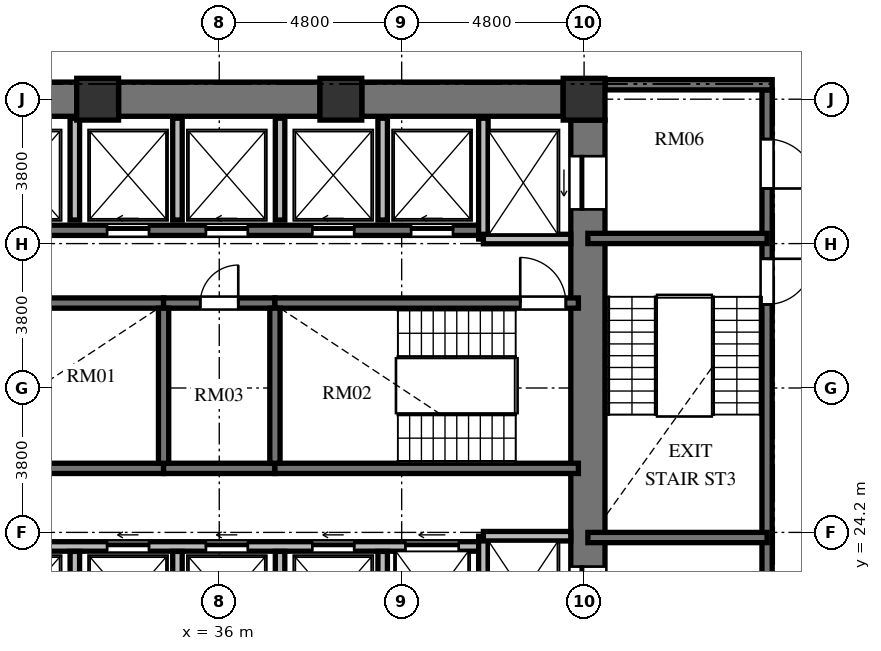
"""IFC4 building model, lengths in metres.
Left out: names, types, materials, properties, quantities, classifications, styles, units other than length and angle.
Written with IfcOpenShell. Run it as: python <this file> out.ifc"""

import sys

from ifc_helpers import new_model, si_unit, direction, frame, frame_2d, origin, origin_2d, place, context, subcontext, project, spatial, rectangle, extrude, element, fill, save


model = new_model("IFC4")
c1 = context("Model", 3, precision=1e-05, world=origin(), true_north=direction((0.0, 1.0)))
c2 = subcontext(c1, "Body", "Model", "MODEL_VIEW")
j1 = project(units=[si_unit("LENGTHUNIT", "METRE"), si_unit("PLANEANGLEUNIT", "RADIAN")], contexts=[c1])
p1 = place(None, origin())
s1 = spatial("IfcSite", under=j1, at=p1, CompositionType="ELEMENT")
p2 = place(p1, origin())
s2 = spatial("IfcBuilding", under=s1, at=p2, CompositionType="ELEMENT")
p3 = place(p2, frame((0.0, 0.0, 72.624)))
s3 = spatial("IfcBuildingStorey", under=s2, at=p3, CompositionType="ELEMENT", Elevation=72.624)
for number, where, z_axis, x_axis in (
    (1, (45.6, 35.6, 0.0), (0.0, 0.0, 1.0), (1.0, 0.0, 0.0)),
    (2, (39.2, 35.6, 0.0), (0.0, 0.0, 1.0), (1.0, 0.0, 0.0)),
    (3, (32.8, 35.6, 0.0), (0.0, 0.0, 1.0), (1.0, 0.0, 0.0)),
):
    element("IfcColumn", number, at=place(p3, frame(where, z_axis=z_axis, x_axis=x_axis)), inside=s3, PredefinedType="COLUMN", context=c2, shape_type="SweptSolid", body=[
        extrude(rectangle(XDim=1.1, YDim=1.1, at=origin_2d()), origin(), (0.0, 0.0, 1.0), 3.648),
    ])
p4 = place(p3, frame((45.7, 20.95, 0.0), z_axis=(0.0, 0.0, 1.0), x_axis=(0.0, 1.0, 0.0)))
e4 = element("IfcWall", 4, at=p4, inside=s3, PredefinedType="SHEAR", context=c2, shape_type="SweptSolid", body=[
    extrude(rectangle(XDim=14.1, YDim=0.9, at=frame_2d((7.05, 0.0))), origin(), (0.0, 0.0, 1.0), 3.648),
])
p5 = place(p4, frame((11.75, 0.0, 0.0)))
e5 = element("IfcOpeningElement", 5, at=p5, cuts=e4, PredefinedType="OPENING", context=c2, shape_type="SweptSolid", body=[
    extrude(rectangle(XDim=1.4, YDim=2.3, at=frame_2d((0.7, 1.15))), frame((0.0, 0.46, 0.0), z_axis=(0.0, -1.0, 0.0), x_axis=(1.0, 0.0, 0.0)), (0.0, 0.0, 1.0), 0.92),
])
p6 = place(p4, frame((0.95, 0.0, 0.0)))
e6 = element("IfcOpeningElement", 6, at=p6, cuts=e4, PredefinedType="OPENING", context=c2, shape_type="SweptSolid", body=[
    extrude(rectangle(XDim=1.4, YDim=2.3, at=frame_2d((0.7, 1.15))), frame((0.0, 0.46, 0.0), z_axis=(0.0, -1.0, 0.0), x_axis=(1.0, 0.0, 0.0)), (0.0, 0.0, 1.0), 0.92),
])
p7 = place(p3, frame((26.95, 35.6, 0.0), z_axis=(0.0, 0.0, 1.0), x_axis=(1.0, 0.0, 0.0)))
e7 = element("IfcWall", 7, at=p7, inside=s3, PredefinedType="SHEAR", context=c2, shape_type="SweptSolid", body=[
    extrude(rectangle(XDim=5.3, YDim=0.9, at=frame_2d((2.65, 0.0))), origin(), (0.0, 0.0, 1.0), 3.648),
])
p8 = place(p3, frame((33.35, 35.6, 0.0), z_axis=(0.0, 0.0, 1.0), x_axis=(1.0, 0.0, 0.0)))
e8 = element("IfcWall", 8, at=p8, inside=s3, PredefinedType="SHEAR", context=c2, shape_type="SweptSolid", body=[
    extrude(rectangle(XDim=5.3, YDim=0.9, at=frame_2d((2.65, 0.0))), origin(), (0.0, 0.0, 1.0), 3.648),
])
p9 = place(p3, frame((39.75, 35.6, 0.0), z_axis=(0.0, 0.0, 1.0), x_axis=(1.0, 0.0, 0.0)))
e9 = element("IfcWall", 9, at=p9, inside=s3, PredefinedType="SHEAR", context=c2, shape_type="SweptSolid", body=[
    extrude(rectangle(XDim=5.3, YDim=0.9, at=frame_2d((2.65, 0.0))), origin(), (0.0, 0.0, 1.0), 3.648),
])
p10 = place(p3, frame((26.55, 30.235, 0.0), z_axis=(0.0, 0.0, 1.0), x_axis=(1.0, 0.0, 0.0)))
e10 = element("IfcWall", 10, at=p10, inside=s3, PredefinedType="SHEAR", context=c2, shape_type="SweptSolid", body=[
    extrude(rectangle(XDim=7.985, YDim=0.27, at=frame_2d((3.992, 0.0))), origin(), (0.0, 0.0, 1.0), 3.648),
])
p11 = place(p3, frame((34.535, 30.235, 0.0), z_axis=(0.0, 0.0, 1.0), x_axis=(1.0, 0.0, 0.0)))
e11 = element("IfcWall", 11, at=p11, inside=s3, PredefinedType="SHEAR", context=c2, shape_type="SweptSolid", body=[
    extrude(rectangle(XDim=2.93, YDim=0.27, at=frame_2d((1.465, 0.0))), origin(), (0.0, 0.0, 1.0), 3.648),
])
p12 = place(p11, frame((0.965, 0.0, 0.0)))
e12 = element("IfcOpeningElement", 12, at=p12, cuts=e11, PredefinedType="OPENING", context=c2, shape_type="SweptSolid", body=[
    extrude(rectangle(XDim=1.0, YDim=2.1, at=frame_2d((0.5, 1.05))), frame((0.0, 0.145, 0.0), z_axis=(0.0, -1.0, 0.0), x_axis=(1.0, 0.0, 0.0)), (0.0, 0.0, 1.0), 0.29),
])
p13 = place(p3, frame((37.465, 30.235, 0.0), z_axis=(0.0, 0.0, 1.0), x_axis=(1.0, 0.0, 0.0)))
e13 = element("IfcWall", 13, at=p13, inside=s3, PredefinedType="SHEAR", context=c2, shape_type="SweptSolid", body=[
    extrude(rectangle(XDim=7.985, YDim=0.27, at=frame_2d((3.992, 0.0))), origin(), (0.0, 0.0, 1.0), 3.648),
])
p14 = place(p13, frame((6.455, 0.0, 0.0)))
e14 = element("IfcOpeningElement", 14, at=p14, cuts=e13, PredefinedType="OPENING", context=c2, shape_type="SweptSolid", body=[
    extrude(rectangle(XDim=1.2, YDim=2.15, at=frame_2d((0.6, 1.075))), frame((0.0, 0.145, 0.0), z_axis=(0.0, -1.0, 0.0), x_axis=(1.0, 0.0, 0.0)), (0.0, 0.0, 1.0), 0.29),
])
p15 = place(p3, frame((26.55, 25.885, 0.0), z_axis=(0.0, 0.0, 1.0), x_axis=(1.0, 0.0, 0.0)))
e15 = element("IfcWall", 15, at=p15, inside=s3, PredefinedType="SHEAR", context=c2, shape_type="SweptSolid", body=[
    extrude(rectangle(XDim=7.985, YDim=0.27, at=frame_2d((3.992, 0.0))), origin(), (0.0, 0.0, 1.0), 3.648),
])
p16 = place(p3, frame((34.535, 25.885, 0.0), z_axis=(0.0, 0.0, 1.0), x_axis=(1.0, 0.0, 0.0)))
e16 = element("IfcWall", 16, at=p16, inside=s3, PredefinedType="SHEAR", context=c2, shape_type="SweptSolid", body=[
    extrude(rectangle(XDim=2.93, YDim=0.27, at=frame_2d((1.465, 0.0))), origin(), (0.0, 0.0, 1.0), 3.648),
])
p17 = place(p3, frame((37.465, 25.885, 0.0), z_axis=(0.0, 0.0, 1.0), x_axis=(1.0, 0.0, 0.0)))
e17 = element("IfcWall", 17, at=p17, inside=s3, PredefinedType="SHEAR", context=c2, shape_type="SweptSolid", body=[
    extrude(rectangle(XDim=7.985, YDim=0.27, at=frame_2d((3.992, 0.0))), origin(), (0.0, 0.0, 1.0), 3.648),
])
for number, where, z_axis, x_axis in (
    (18, (34.535, 26.02, 0.0), (0.0, 0.0, 1.0), (0.0, 1.0, 0.0)),
    (19, (37.465, 26.02, 0.0), (0.0, 0.0, 1.0), (0.0, 1.0, 0.0)),
):
    element("IfcWall", number, at=place(p3, frame(where, z_axis=z_axis, x_axis=x_axis)), inside=s3, PredefinedType="SHEAR", context=c2, shape_type="SweptSolid", body=[
        extrude(rectangle(XDim=4.08, YDim=0.27, at=frame_2d((2.04, 0.0))), origin(), (0.0, 0.0, 1.0), 3.648),
    ])
p18 = place(p3, frame((26.55, 32.15, 0.0), z_axis=(0.0, 0.0, 1.0), x_axis=(1.0, 0.0, 0.0)))
e20 = element("IfcWall", 20, at=p18, inside=s3, PredefinedType="SHEAR", context=c2, shape_type="SweptSolid", body=[
    extrude(rectangle(XDim=16.4, YDim=0.27, at=frame_2d((8.2, 0.0))), origin(), (0.0, 0.0, 1.0), 3.648),
])
p19 = place(p18, frame((1.1, 0.0, 0.0)))
e21 = element("IfcOpeningElement", 21, at=p19, cuts=e20, PredefinedType="OPENING", context=c2, shape_type="SweptSolid", body=[
    extrude(rectangle(XDim=1.1, YDim=2.2, at=frame_2d((0.55, 1.1))), frame((0.0, 0.145, 0.0), z_axis=(0.0, -1.0, 0.0), x_axis=(1.0, 0.0, 0.0)), (0.0, 0.0, 1.0), 0.29),
])
p20 = place(p18, frame((3.7, 0.0, 0.0)))
e22 = element("IfcOpeningElement", 22, at=p20, cuts=e20, PredefinedType="OPENING", context=c2, shape_type="SweptSolid", body=[
    extrude(rectangle(XDim=1.1, YDim=2.2, at=frame_2d((0.55, 1.1))), frame((0.0, 0.145, 0.0), z_axis=(0.0, -1.0, 0.0), x_axis=(1.0, 0.0, 0.0)), (0.0, 0.0, 1.0), 0.29),
])
p21 = place(p18, frame((6.5, 0.0, 0.0)))
e23 = element("IfcOpeningElement", 23, at=p21, cuts=e20, PredefinedType="OPENING", context=c2, shape_type="SweptSolid", body=[
    extrude(rectangle(XDim=1.1, YDim=2.2, at=frame_2d((0.55, 1.1))), frame((0.0, 0.145, 0.0), z_axis=(0.0, -1.0, 0.0), x_axis=(1.0, 0.0, 0.0)), (0.0, 0.0, 1.0), 0.29),
])
p22 = place(p18, frame((9.1, 0.0, 0.0)))
e24 = element("IfcOpeningElement", 24, at=p22, cuts=e20, PredefinedType="OPENING", context=c2, shape_type="SweptSolid", body=[
    extrude(rectangle(XDim=1.1, YDim=2.2, at=frame_2d((0.55, 1.1))), frame((0.0, 0.145, 0.0), z_axis=(0.0, -1.0, 0.0), x_axis=(1.0, 0.0, 0.0)), (0.0, 0.0, 1.0), 0.29),
])
p23 = place(p18, frame((11.9, 0.0, 0.0)))
e25 = element("IfcOpeningElement", 25, at=p23, cuts=e20, PredefinedType="OPENING", context=c2, shape_type="SweptSolid", body=[
    extrude(rectangle(XDim=1.1, YDim=2.2, at=frame_2d((0.55, 1.1))), frame((0.0, 0.145, 0.0), z_axis=(0.0, -1.0, 0.0), x_axis=(1.0, 0.0, 0.0)), (0.0, 0.0, 1.0), 0.29),
])
p24 = place(p18, frame((14.5, 0.0, 0.0)))
e26 = element("IfcOpeningElement", 26, at=p24, cuts=e20, PredefinedType="OPENING", context=c2, shape_type="SweptSolid", body=[
    extrude(rectangle(XDim=1.1, YDim=2.2, at=frame_2d((0.55, 1.1))), frame((0.0, 0.145, 0.0), z_axis=(0.0, -1.0, 0.0), x_axis=(1.0, 0.0, 0.0)), (0.0, 0.0, 1.0), 0.29),
])
p25 = place(p3, frame((26.75, 23.83, 0.0), z_axis=(0.0, 0.0, 1.0), x_axis=(1.0, 0.0, 0.0)))
e27 = element("IfcWall", 27, at=p25, inside=s3, PredefinedType="SOLIDWALL", context=c2, shape_type="SweptSolid", body=[
    extrude(rectangle(XDim=16.2, YDim=0.25, at=frame_2d((8.1, 0.0))), origin(), (0.0, 0.0, 1.0), 3.198),
])
p26 = place(p25, frame((0.9, 0.0, 0.0)))
e28 = element("IfcOpeningElement", 28, at=p26, cuts=e27, PredefinedType="OPENING", context=c2, shape_type="SweptSolid", body=[
    extrude(rectangle(XDim=1.1, YDim=2.2, at=frame_2d((0.55, 1.1))), frame((0.0, 0.135, 0.0), z_axis=(0.0, -1.0, 0.0), x_axis=(1.0, 0.0, 0.0)), (0.0, 0.0, 1.0), 0.27),
])
p27 = place(p25, frame((3.5, 0.0, 0.0)))
e29 = element("IfcOpeningElement", 29, at=p27, cuts=e27, PredefinedType="OPENING", context=c2, shape_type="SweptSolid", body=[
    extrude(rectangle(XDim=1.1, YDim=2.2, at=frame_2d((0.55, 1.1))), frame((0.0, 0.135, 0.0), z_axis=(0.0, -1.0, 0.0), x_axis=(1.0, 0.0, 0.0)), (0.0, 0.0, 1.0), 0.27),
])
p28 = place(p25, frame((6.3, 0.0, 0.0)))
e30 = element("IfcOpeningElement", 30, at=p28, cuts=e27, PredefinedType="OPENING", context=c2, shape_type="SweptSolid", body=[
    extrude(rectangle(XDim=1.1, YDim=2.2, at=frame_2d((0.55, 1.1))), frame((0.0, 0.135, 0.0), z_axis=(0.0, -1.0, 0.0), x_axis=(1.0, 0.0, 0.0)), (0.0, 0.0, 1.0), 0.27),
])
p29 = place(p25, frame((8.9, 0.0, 0.0)))
e31 = element("IfcOpeningElement", 31, at=p29, cuts=e27, PredefinedType="OPENING", context=c2, shape_type="SweptSolid", body=[
    extrude(rectangle(XDim=1.1, YDim=2.2, at=frame_2d((0.55, 1.1))), frame((0.0, 0.135, 0.0), z_axis=(0.0, -1.0, 0.0), x_axis=(1.0, 0.0, 0.0)), (0.0, 0.0, 1.0), 0.27),
])
p30 = place(p25, frame((11.7, 0.0, 0.0)))
e32 = element("IfcOpeningElement", 32, at=p30, cuts=e27, PredefinedType="OPENING", context=c2, shape_type="SweptSolid", body=[
    extrude(rectangle(XDim=1.1, YDim=2.2, at=frame_2d((0.55, 1.1))), frame((0.0, 0.135, 0.0), z_axis=(0.0, -1.0, 0.0), x_axis=(1.0, 0.0, 0.0)), (0.0, 0.0, 1.0), 0.27),
])
p31 = place(p25, frame((14.15, 0.0, 0.0)))
e33 = element("IfcOpeningElement", 33, at=p31, cuts=e27, PredefinedType="OPENING", context=c2, shape_type="SweptSolid", body=[
    extrude(rectangle(XDim=1.4, YDim=2.3, at=frame_2d((0.7, 1.15))), frame((0.0, 0.135, 0.0), z_axis=(0.0, -1.0, 0.0), x_axis=(1.0, 0.0, 0.0)), (0.0, 0.0, 1.0), 0.27),
])
p32 = place(p3, frame((42.95, 31.92, 0.0), z_axis=(0.0, 0.0, 1.0), x_axis=(0.0, 1.0, 0.0)))
e34 = element("IfcWall", 34, at=p32, inside=s3, PredefinedType="SOLIDWALL", context=c2, shape_type="SweptSolid", body=[
    extrude(rectangle(XDim=3.18, YDim=0.25, at=frame_2d((1.59, 0.0))), origin(), (0.0, 0.0, 1.0), 3.198),
])
p33 = place(p3, frame((42.95, 31.92, 0.0), z_axis=(0.0, 0.0, 1.0), x_axis=(1.0, 0.0, 0.0)))
e35 = element("IfcWall", 35, at=p33, inside=s3, PredefinedType="SOLIDWALL", context=c2, shape_type="SweptSolid", body=[
    extrude(rectangle(XDim=2.3, YDim=0.25, at=frame_2d((1.15, 0.0))), origin(), (0.0, 0.0, 1.0), 3.198),
])
p34 = place(p3, frame((42.95, 20.9, 0.0), z_axis=(0.0, 0.0, 1.0), x_axis=(0.0, 1.0, 0.0)))
e36 = element("IfcWall", 36, at=p34, inside=s3, PredefinedType="SOLIDWALL", context=c2, shape_type="SweptSolid", body=[
    extrude(rectangle(XDim=3.2, YDim=0.25, at=frame_2d((1.6, 0.0))), origin(), (0.0, 0.0, 1.0), 3.198),
])
p35 = place(p3, frame((42.95, 24.1, 0.0), z_axis=(0.0, 0.0, 1.0), x_axis=(1.0, 0.0, 0.0)))
e37 = element("IfcWall", 37, at=p35, inside=s3, PredefinedType="SOLIDWALL", context=c2, shape_type="SweptSolid", body=[
    extrude(rectangle(XDim=2.3, YDim=0.25, at=frame_2d((1.15, 0.0))), origin(), (0.0, 0.0, 1.0), 3.198),
])
p36 = place(p3, frame((32.2, 32.42, 0.0), z_axis=(0.0, 0.0, 1.0), x_axis=(0.0, 1.0, 0.0)))
e38 = element("IfcWall", 38, at=p36, inside=s3, PredefinedType="SOLIDWALL", context=c2, shape_type="SweptSolid", body=[
    extrude(rectangle(XDim=2.68, YDim=0.25, at=frame_2d((1.34, 0.0))), origin(), (0.0, 0.0, 1.0), 3.198),
])
p37 = place(p3, frame((32.2, 20.9, 0.0), z_axis=(0.0, 0.0, 1.0), x_axis=(0.0, 1.0, 0.0)))
e39 = element("IfcWall", 39, at=p37, inside=s3, PredefinedType="SOLIDWALL", context=c2, shape_type="SweptSolid", body=[
    extrude(rectangle(XDim=2.8, YDim=0.25, at=frame_2d((1.4, 0.0))), origin(), (0.0, 0.0, 1.0), 3.198),
])
p38 = place(p3, frame((34.9, 32.42, 0.0), z_axis=(0.0, 0.0, 1.0), x_axis=(0.0, 1.0, 0.0)))
e40 = element("IfcWall", 40, at=p38, inside=s3, PredefinedType="SOLIDWALL", context=c2, shape_type="SweptSolid", body=[
    extrude(rectangle(XDim=2.68, YDim=0.25, at=frame_2d((1.34, 0.0))), origin(), (0.0, 0.0, 1.0), 3.198),
])
p39 = place(p3, frame((34.9, 20.9, 0.0), z_axis=(0.0, 0.0, 1.0), x_axis=(0.0, 1.0, 0.0)))
e41 = element("IfcWall", 41, at=p39, inside=s3, PredefinedType="SOLIDWALL", context=c2, shape_type="SweptSolid", body=[
    extrude(rectangle(XDim=2.8, YDim=0.25, at=frame_2d((1.4, 0.0))), origin(), (0.0, 0.0, 1.0), 3.198),
])
p40 = place(p3, frame((37.6, 32.42, 0.0), z_axis=(0.0, 0.0, 1.0), x_axis=(0.0, 1.0, 0.0)))
e42 = element("IfcWall", 42, at=p40, inside=s3, PredefinedType="SOLIDWALL", context=c2, shape_type="SweptSolid", body=[
    extrude(rectangle(XDim=2.68, YDim=0.25, at=frame_2d((1.34, 0.0))), origin(), (0.0, 0.0, 1.0), 3.198),
])
p41 = place(p3, frame((37.6, 20.9, 0.0), z_axis=(0.0, 0.0, 1.0), x_axis=(0.0, 1.0, 0.0)))
e43 = element("IfcWall", 43, at=p41, inside=s3, PredefinedType="SOLIDWALL", context=c2, shape_type="SweptSolid", body=[
    extrude(rectangle(XDim=2.8, YDim=0.25, at=frame_2d((1.4, 0.0))), origin(), (0.0, 0.0, 1.0), 3.198),
])
p42 = place(p3, frame((40.3, 32.42, 0.0), z_axis=(0.0, 0.0, 1.0), x_axis=(0.0, 1.0, 0.0)))
e44 = element("IfcWall", 44, at=p42, inside=s3, PredefinedType="SOLIDWALL", context=c2, shape_type="SweptSolid", body=[
    extrude(rectangle(XDim=2.68, YDim=0.25, at=frame_2d((1.34, 0.0))), origin(), (0.0, 0.0, 1.0), 3.198),
])
p43 = place(p3, frame((40.3, 20.9, 0.0), z_axis=(0.0, 0.0, 1.0), x_axis=(0.0, 1.0, 0.0)))
e45 = element("IfcWall", 45, at=p43, inside=s3, PredefinedType="SOLIDWALL", context=c2, shape_type="SweptSolid", body=[
    extrude(rectangle(XDim=2.8, YDim=0.25, at=frame_2d((1.4, 0.0))), origin(), (0.0, 0.0, 1.0), 3.198),
])
p44 = place(p3, frame((50.415, 35.845, 0.0), z_axis=(0.0, 0.0, 1.0), x_axis=(0.0, -1.0, 0.0)))
e46 = element("IfcWall", 46, at=p44, inside=s3, PredefinedType="SHEAR", context=c2, shape_type="SweptSolid", body=[
    extrude(rectangle(XDim=15.825, YDim=0.27, at=frame_2d((7.913, 0.0))), origin(), (0.0, 0.0, 1.0), 3.648),
])
p45 = place(p44, frame((4.445, 0.0, 0.0)))
e47 = element("IfcOpeningElement", 47, at=p45, cuts=e46, PredefinedType="OPENING", context=c2, shape_type="SweptSolid", body=[
    extrude(rectangle(XDim=1.2, YDim=2.15, at=frame_2d((0.6, 1.075))), frame((0.0, 0.145, 0.0), z_axis=(0.0, -1.0, 0.0), x_axis=(1.0, 0.0, 0.0)), (0.0, 0.0, 1.0), 0.29),
])
p46 = place(p44, frame((1.295, 0.0, 0.0)))
e48 = element("IfcOpeningElement", 48, at=p46, cuts=e46, PredefinedType="OPENING", context=c2, shape_type="SweptSolid", body=[
    extrude(rectangle(XDim=1.3, YDim=2.2, at=frame_2d((0.65, 1.1))), frame((0.0, 0.145, 0.0), z_axis=(0.0, -1.0, 0.0), x_axis=(1.0, 0.0, 0.0)), (0.0, 0.0, 1.0), 0.29),
])
p47 = place(p44, frame((13.095, 0.0, 0.0)))
e49 = element("IfcOpeningElement", 49, at=p47, cuts=e46, PredefinedType="OPENING", context=c2, shape_type="SweptSolid", body=[
    extrude(rectangle(XDim=1.3, YDim=2.2, at=frame_2d((0.65, 1.1))), frame((0.0, 0.145, 0.0), z_axis=(0.0, -1.0, 0.0), x_axis=(1.0, 0.0, 0.0)), (0.0, 0.0, 1.0), 0.29),
])
p48 = place(p3, frame((46.15, 35.98, 0.0), z_axis=(0.0, 0.0, 1.0), x_axis=(1.0, 0.0, 0.0)))
e50 = element("IfcWall", 50, at=p48, inside=s3, PredefinedType="SHEAR", context=c2, shape_type="SweptSolid", body=[
    extrude(rectangle(XDim=4.4, YDim=0.27, at=frame_2d((2.2, 0.0))), origin(), (0.0, 0.0, 1.0), 3.648),
])
for number, where, z_axis, x_axis in (
    (51, (45.7, 31.935, 0.0), (0.0, 0.0, 1.0), (1.0, 0.0, 0.0)),
    (52, (45.7, 24.065, 0.0), (0.0, 0.0, 1.0), (1.0, 0.0, 0.0)),
):
    element("IfcWall", number, at=place(p3, frame(where, z_axis=z_axis, x_axis=x_axis)), inside=s3, PredefinedType="SHEAR", context=c2, shape_type="SweptSolid", body=[
        extrude(rectangle(XDim=4.715, YDim=0.27, at=frame_2d((2.357, 0.0))), origin(), (0.0, 0.0, 1.0), 3.648),
    ])
p49 = place(p14, origin())
e53 = element("IfcDoor", 53, at=p49, inside=s3, OperationType="SINGLE_SWING_LEFT", PredefinedType="DOOR", context=c2, shape_type="SweptSolid", body=[
    extrude(rectangle(XDim=1.2, YDim=2.15, at=frame_2d((0.6, 1.075))), frame((0.0, 0.025, 0.0), z_axis=(0.0, -1.0, 0.0), x_axis=(1.0, 0.0, 0.0)), (0.0, 0.0, 1.0), 0.05),
])
fill(e14, e53)
p50 = place(p12, origin())
e54 = element("IfcDoor", 54, at=p50, inside=s3, OperationType="SINGLE_SWING_RIGHT", PredefinedType="DOOR", context=c2, shape_type="SweptSolid", body=[
    extrude(rectangle(XDim=1.0, YDim=2.1, at=frame_2d((0.5, 1.05))), frame((0.0, 0.025, 0.0), z_axis=(0.0, -1.0, 0.0), x_axis=(1.0, 0.0, 0.0)), (0.0, 0.0, 1.0), 0.05),
])
fill(e12, e54)
p51 = place(p21, origin())
e55 = element("IfcDoor", 55, at=p51, inside=s3, OperationType="SLIDING_TO_LEFT", PredefinedType="DOOR", context=c2, shape_type="SweptSolid", body=[
    extrude(rectangle(XDim=1.1, YDim=2.2, at=frame_2d((0.55, 1.1))), frame((0.0, 0.025, 0.0), z_axis=(0.0, -1.0, 0.0), x_axis=(1.0, 0.0, 0.0)), (0.0, 0.0, 1.0), 0.05),
])
fill(e23, e55)
p52 = place(p22, origin())
e56 = element("IfcDoor", 56, at=p52, inside=s3, OperationType="SLIDING_TO_LEFT", PredefinedType="DOOR", context=c2, shape_type="SweptSolid", body=[
    extrude(rectangle(XDim=1.1, YDim=2.2, at=frame_2d((0.55, 1.1))), frame((0.0, 0.025, 0.0), z_axis=(0.0, -1.0, 0.0), x_axis=(1.0, 0.0, 0.0)), (0.0, 0.0, 1.0), 0.05),
])
fill(e24, e56)
p53 = place(p28, origin())
e57 = element("IfcDoor", 57, at=p53, inside=s3, OperationType="SLIDING_TO_LEFT", PredefinedType="DOOR", context=c2, shape_type="SweptSolid", body=[
    extrude(rectangle(XDim=1.1, YDim=2.2, at=frame_2d((0.55, 1.1))), frame((0.0, 0.025, 0.0), z_axis=(0.0, -1.0, 0.0), x_axis=(1.0, 0.0, 0.0)), (0.0, 0.0, 1.0), 0.05),
])
fill(e30, e57)
p54 = place(p29, origin())
e58 = element("IfcDoor", 58, at=p54, inside=s3, OperationType="SLIDING_TO_LEFT", PredefinedType="DOOR", context=c2, shape_type="SweptSolid", body=[
    extrude(rectangle(XDim=1.1, YDim=2.2, at=frame_2d((0.55, 1.1))), frame((0.0, 0.025, 0.0), z_axis=(0.0, -1.0, 0.0), x_axis=(1.0, 0.0, 0.0)), (0.0, 0.0, 1.0), 0.05),
])
fill(e31, e58)
p55 = place(p23, origin())
e59 = element("IfcDoor", 59, at=p55, inside=s3, OperationType="SLIDING_TO_LEFT", PredefinedType="DOOR", context=c2, shape_type="SweptSolid", body=[
    extrude(rectangle(XDim=1.1, YDim=2.2, at=frame_2d((0.55, 1.1))), frame((0.0, 0.025, 0.0), z_axis=(0.0, -1.0, 0.0), x_axis=(1.0, 0.0, 0.0)), (0.0, 0.0, 1.0), 0.05),
])
fill(e25, e59)
p56 = place(p24, origin())
e60 = element("IfcDoor", 60, at=p56, inside=s3, OperationType="SLIDING_TO_LEFT", PredefinedType="DOOR", context=c2, shape_type="SweptSolid", body=[
    extrude(rectangle(XDim=1.1, YDim=2.2, at=frame_2d((0.55, 1.1))), frame((0.0, 0.025, 0.0), z_axis=(0.0, -1.0, 0.0), x_axis=(1.0, 0.0, 0.0)), (0.0, 0.0, 1.0), 0.05),
])
fill(e26, e60)
p57 = place(p30, origin())
e61 = element("IfcDoor", 61, at=p57, inside=s3, OperationType="SLIDING_TO_LEFT", PredefinedType="DOOR", context=c2, shape_type="SweptSolid", body=[
    extrude(rectangle(XDim=1.1, YDim=2.2, at=frame_2d((0.55, 1.1))), frame((0.0, 0.025, 0.0), z_axis=(0.0, -1.0, 0.0), x_axis=(1.0, 0.0, 0.0)), (0.0, 0.0, 1.0), 0.05),
])
fill(e32, e61)
p58 = place(p5, origin())
e62 = element("IfcDoor", 62, at=p58, inside=s3, OperationType="SLIDING_TO_LEFT", PredefinedType="DOOR", context=c2, shape_type="SweptSolid", body=[
    extrude(rectangle(XDim=1.4, YDim=2.3, at=frame_2d((0.7, 1.15))), frame((0.0, 0.025, 0.0), z_axis=(0.0, -1.0, 0.0), x_axis=(1.0, 0.0, 0.0)), (0.0, 0.0, 1.0), 0.05),
])
fill(e5, e62)
p59 = place(p6, origin())
e63 = element("IfcDoor", 63, at=p59, inside=s3, OperationType="SLIDING_TO_LEFT", PredefinedType="DOOR", context=c2, shape_type="SweptSolid", body=[
    extrude(rectangle(XDim=1.4, YDim=2.3, at=frame_2d((0.7, 1.15))), frame((0.0, 0.025, 0.0), z_axis=(0.0, -1.0, 0.0), x_axis=(1.0, 0.0, 0.0)), (0.0, 0.0, 1.0), 0.05),
])
fill(e6, e63)
p60 = place(p31, origin())
e64 = element("IfcDoor", 64, at=p60, inside=s3, OperationType="SLIDING_TO_LEFT", PredefinedType="DOOR", context=c2, shape_type="SweptSolid", body=[
    extrude(rectangle(XDim=1.4, YDim=2.3, at=frame_2d((0.7, 1.15))), frame((0.0, 0.025, 0.0), z_axis=(0.0, -1.0, 0.0), x_axis=(1.0, 0.0, 0.0)), (0.0, 0.0, 1.0), 0.05),
])
fill(e33, e64)
p61 = place(p45, origin())
e65 = element("IfcDoor", 65, at=p61, inside=s3, OperationType="SINGLE_SWING_LEFT", PredefinedType="DOOR", context=c2, shape_type="SweptSolid", body=[
    extrude(rectangle(XDim=1.2, YDim=2.15, at=frame_2d((0.6, 1.075))), frame((0.0, 0.025, 0.0), z_axis=(0.0, -1.0, 0.0), x_axis=(1.0, 0.0, 0.0)), (0.0, 0.0, 1.0), 0.05),
])
fill(e47, e65)
p62 = place(p46, origin())
e66 = element("IfcDoor", 66, at=p62, inside=s3, OperationType="SINGLE_SWING_RIGHT", PredefinedType="DOOR", context=c2, shape_type="SweptSolid", body=[
    extrude(rectangle(XDim=1.3, YDim=2.2, at=frame_2d((0.65, 1.1))), frame((0.0, 0.025, 0.0), z_axis=(0.0, -1.0, 0.0), x_axis=(1.0, 0.0, 0.0)), (0.0, 0.0, 1.0), 0.05),
])
fill(e48, e66)
save(model, sys.argv[1])
